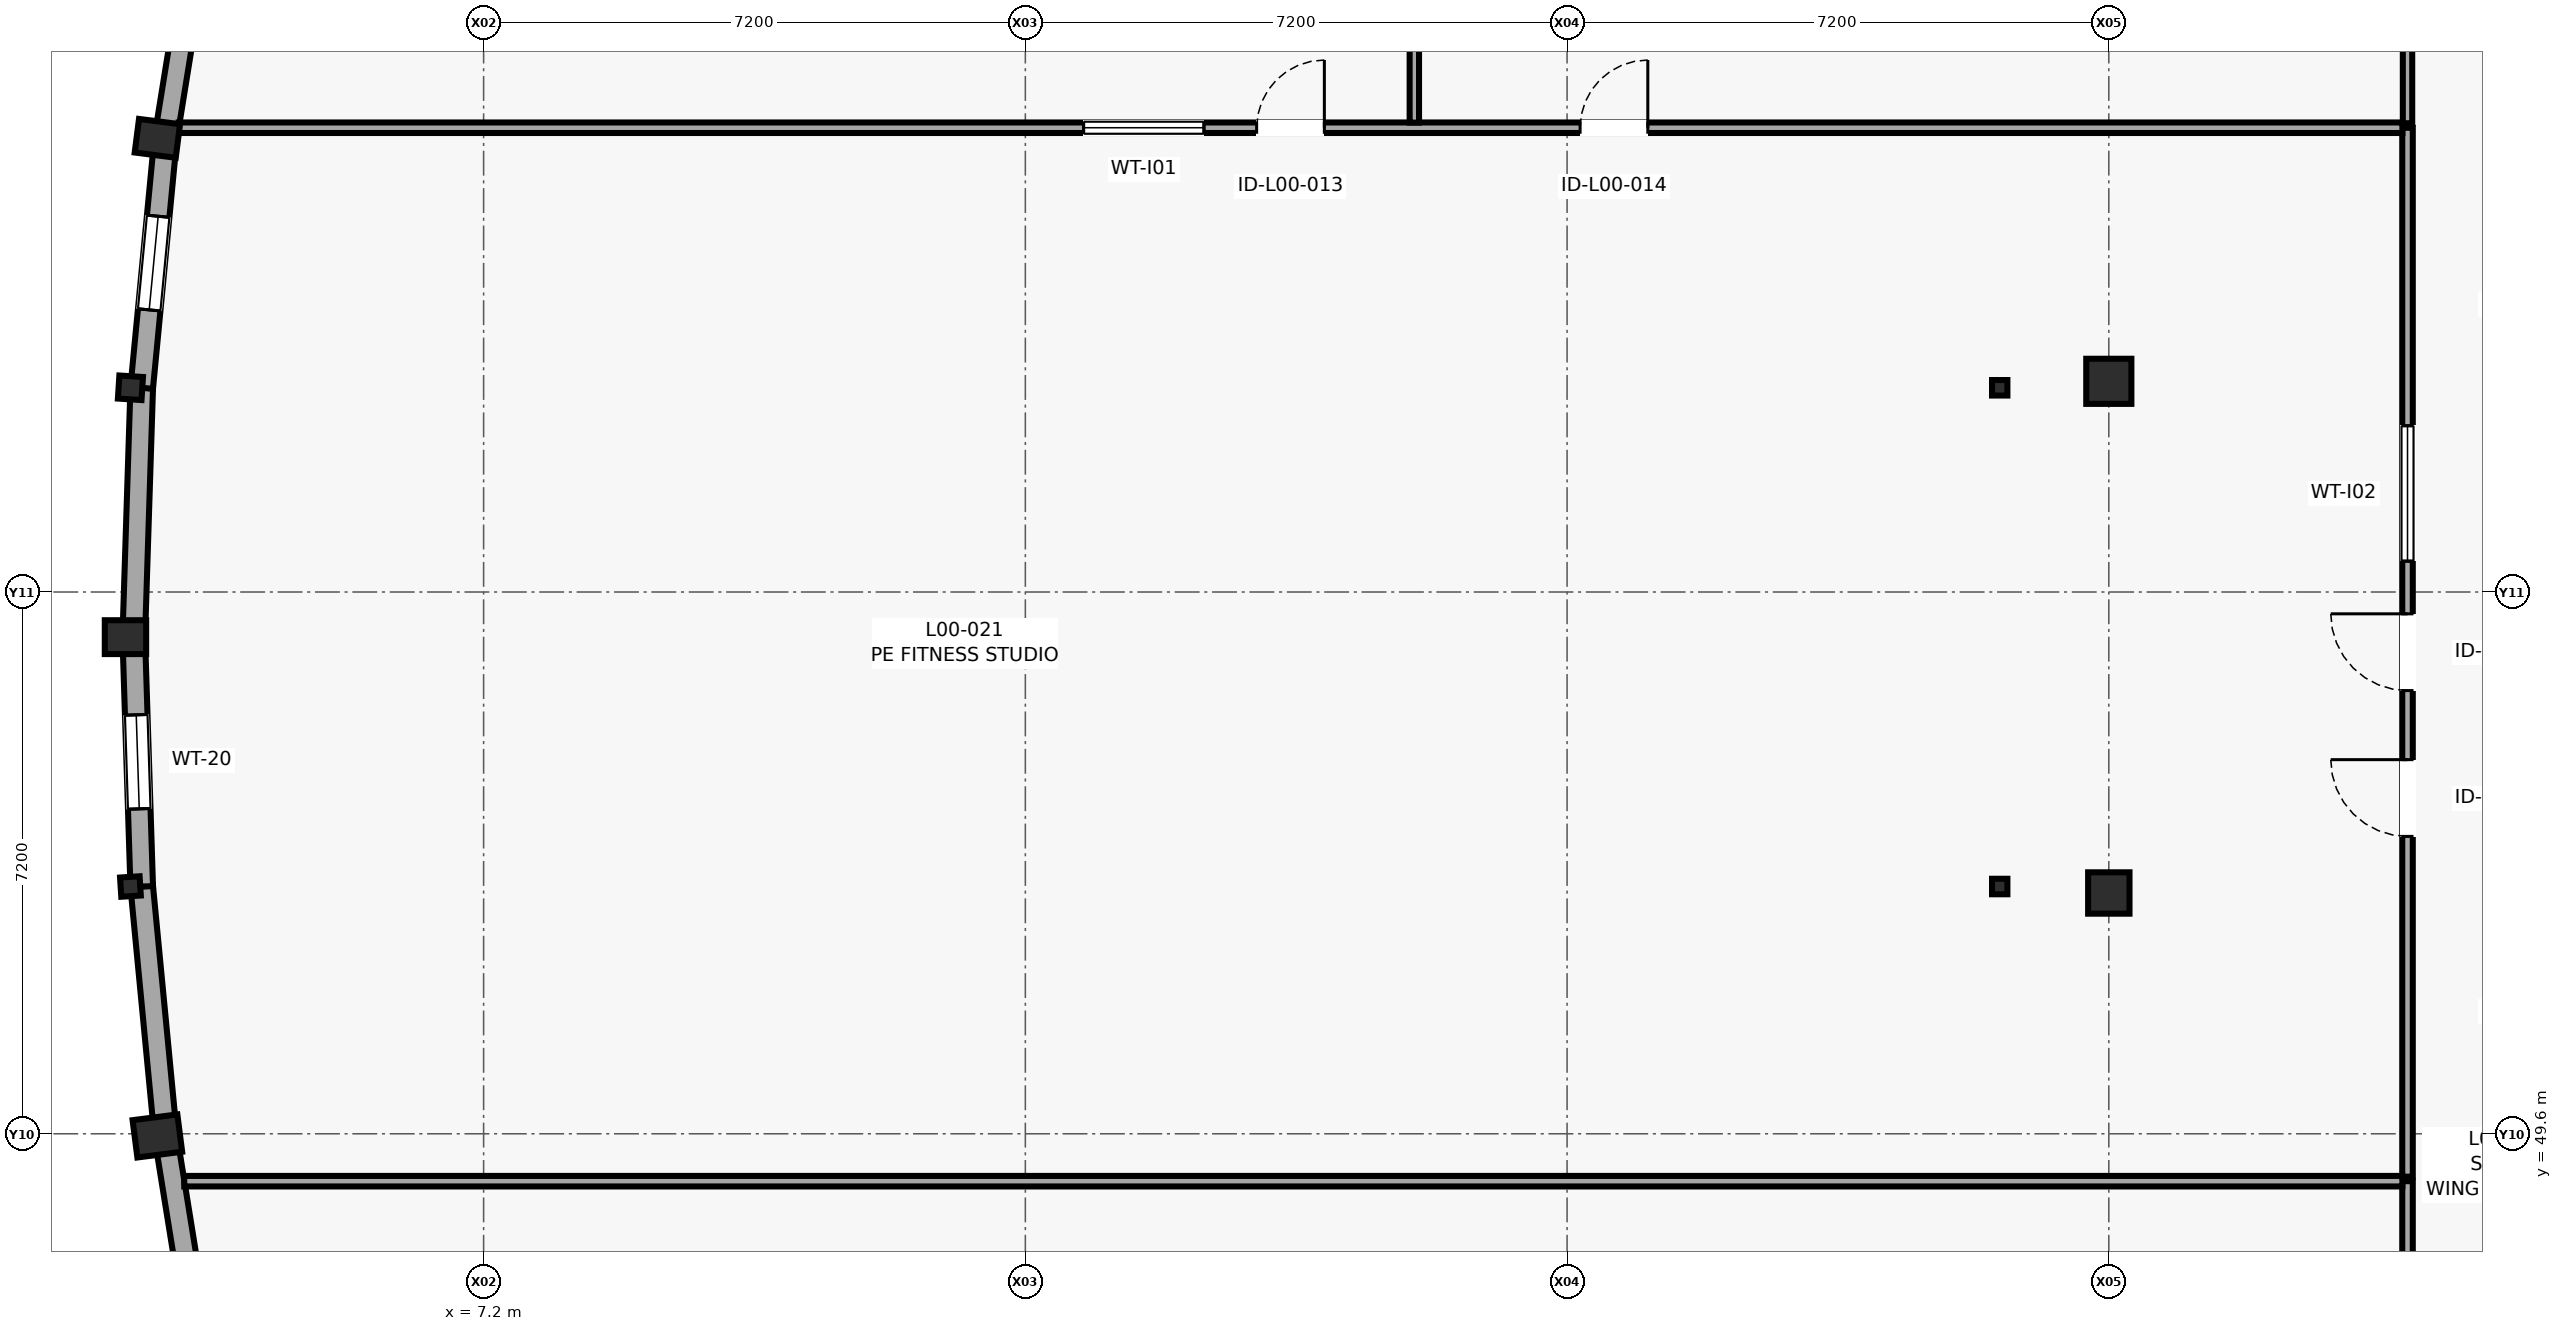
"""IFC4 building model, lengths in metres.
Left out: names, types, materials, properties, quantities, classifications, styles, units other than length and angle.
Written with IfcOpenShell. Run it as: python <this file> out.ifc"""

import sys

from ifc_helpers import new_model, si_unit, direction, frame, frame_2d, origin, origin_2d, place, context, subcontext, project, spatial, rectangle, i_section, extrude, element, fill, save


model = new_model("IFC4")
c1 = context("Model", 3, precision=1e-05, world=origin(), true_north=direction((0.0, 1.0)))
c2 = subcontext(c1, "Body", "Model", "MODEL_VIEW")
j1 = project(units=[si_unit("LENGTHUNIT", "METRE"), si_unit("PLANEANGLEUNIT", "RADIAN")], contexts=[c1])
p1 = place(None, origin())
s1 = spatial("IfcSite", under=j1, at=p1, CompositionType="ELEMENT")
p2 = place(p1, origin())
s2 = spatial("IfcBuilding", under=s1, at=p2, CompositionType="ELEMENT")
p3 = place(p2, origin())
s3 = spatial("IfcBuildingStorey", under=s2, at=p3, CompositionType="ELEMENT", Elevation=0.0)
p4 = place(p3, frame((2.44, 56.2, 0.0), z_axis=(0.0, 0.0, 1.0), x_axis=(0.0, 1.0, 0.0)))
e1 = element("IfcColumn", 1, at=p4, inside=s3, PredefinedType="PILASTER", context=c2, shape_type="SweptSolid", body=[
    extrude(rectangle(XDim=0.45, YDim=0.55, at=origin_2d()), origin(), (0.0, 0.0, 1.0), 4.2),
])
p5 = place(p3, frame((2.506, 52.886, 0.0), z_axis=(0.0, 0.0, 1.0), x_axis=(-0.063661438132, 0.99797155335, 0.0)))
e2 = element("IfcColumn", 2, at=p5, inside=s3, PredefinedType="COLUMN", context=c2, shape_type="SweptSolid", body=[
    extrude(i_section(OverallWidth=0.256, OverallDepth=0.26, WebThickness=0.01, FlangeThickness=0.017, FilletRadius=0.013, at=origin_2d()), origin(), (0.0, 0.0, 1.0), 4.2),
])
p6 = place(p3, frame((2.506, 59.514, 0.0), z_axis=(0.0, 0.0, 1.0), x_axis=(0.063661438132, 0.99797155335, 0.0)))
e3 = element("IfcColumn", 3, at=p6, inside=s3, PredefinedType="COLUMN", context=c2, shape_type="SweptSolid", body=[
    extrude(i_section(OverallWidth=0.307, OverallDepth=0.314, WebThickness=0.012, FlangeThickness=0.019, FilletRadius=0.015, at=origin_2d()), origin(), (0.0, 0.0, 1.0), 4.2),
])
p7 = place(p3, frame((2.864, 49.571, 0.0), z_axis=(0.0, 0.0, 1.0), x_axis=(-0.12741083733, 0.991850028246, 0.0)))
e4 = element("IfcColumn", 4, at=p7, inside=s3, PredefinedType="PILASTER", context=c2, shape_type="SweptSolid", body=[
    extrude(rectangle(XDim=0.5, YDim=0.6, at=origin_2d()), origin(), (0.0, 0.0, 1.0), 4.2),
])
p8 = place(p3, frame((2.864, 62.829, 0.0), z_axis=(0.0, 0.0, 1.0), x_axis=(0.12741083733, 0.991850028246, 0.0)))
e5 = element("IfcColumn", 5, at=p8, inside=s3, PredefinedType="PILASTER", context=c2, shape_type="SweptSolid", body=[
    extrude(rectangle(XDim=0.45, YDim=0.55, at=origin_2d()), origin(), (0.0, 0.0, 1.0), 4.2),
])
p9 = place(p3, frame((28.8, 52.8, 0.0), z_axis=(0.0, 0.0, 1.0), x_axis=(1.0, 0.0, 0.0)))
e6 = element("IfcColumn", 6, at=p9, inside=s3, PredefinedType="COLUMN", context=c2, shape_type="SweptSolid", body=[
    extrude(rectangle(XDim=0.55, YDim=0.55, at=origin_2d()), origin(), (0.0, 0.0, 1.0), 4.2),
])
p10 = place(p3, frame((28.8, 59.6, 0.0), z_axis=(0.0, 0.0, 1.0), x_axis=(1.0, 0.0, 0.0)))
e7 = element("IfcColumn", 7, at=p10, inside=s3, PredefinedType="COLUMN", context=c2, shape_type="SweptSolid", body=[
    extrude(rectangle(XDim=0.6, YDim=0.6, at=origin_2d()), origin(), (0.0, 0.0, 1.0), 4.2),
])
for number, where, z_axis, x_axis in (
    (8, (27.35, 52.886, 0.0), (0.0, 0.0, 1.0), (1.0, 0.0, 0.0)),
    (9, (27.35, 59.514, 0.0), (0.0, 0.0, 1.0), (1.0, 0.0, 0.0)),
):
    element("IfcColumn", number, at=place(p3, frame(where, z_axis=z_axis, x_axis=x_axis)), inside=s3, PredefinedType="COLUMN", context=c2, shape_type="SweptSolid", body=[
        extrude(i_section(OverallWidth=0.204, OverallDepth=0.206, WebThickness=0.008, FlangeThickness=0.012, FilletRadius=0.01, at=origin_2d()), origin(), (0.0, 0.0, 1.0), 3.935),
    ])
p11 = place(p3, frame((2.974, 49.571, 0.0), z_axis=(0.0, 0.0, 1.0), x_axis=(0.159349054769, -0.987222304623, 0.0)))
e10 = element("IfcWall", 10, at=p11, inside=s3, PredefinedType="SOLIDWALL", context=c2, shape_type="SweptSolid", body=[
    extrude(rectangle(XDim=3.357, YDim=0.3, at=frame_2d((1.678, 0.0))), origin(), (0.0, 0.0, 1.0), 3.68),
])
p12 = place(p3, frame((2.656, 52.886, 0.0), z_axis=(0.0, 0.0, 1.0), x_axis=(0.095525216858, -0.995427010355, 0.0)))
e11 = element("IfcWall", 11, at=p12, inside=s3, PredefinedType="SOLIDWALL", context=c2, shape_type="SweptSolid", body=[
    extrude(rectangle(XDim=3.33, YDim=0.3, at=frame_2d((1.665, 0.0))), origin(), (0.0, 0.0, 1.0), 3.68),
])
p13 = place(p3, frame((2.55, 56.2, 0.0), z_axis=(0.0, 0.0, 1.0), x_axis=(0.031956559473, -0.999489258725, 0.0)))
e12 = element("IfcWall", 12, at=p13, inside=s3, PredefinedType="SOLIDWALL", context=c2, shape_type="SweptSolid", body=[
    extrude(rectangle(XDim=3.316, YDim=0.3, at=frame_2d((1.658, 0.0))), origin(), (0.0, 0.0, 1.0), 3.68),
])
p14 = place(p13, frame((1.033, 0.0, 1.15)))
e13 = element("IfcOpeningElement", 13, at=p14, cuts=e12, PredefinedType="OPENING", context=c2, shape_type="SweptSolid", body=[
    extrude(rectangle(XDim=1.25, YDim=1.25, at=frame_2d((0.625, 0.625))), frame((0.0, 0.16, 0.0), z_axis=(0.0, -1.0, 0.0), x_axis=(1.0, 0.0, 0.0)), (0.0, 0.0, 1.0), 0.32),
])
p15 = place(p3, frame((2.656, 59.514, 0.0), z_axis=(0.0, 0.0, 1.0), x_axis=(-0.031956559473, -0.999489258725, 0.0)))
e14 = element("IfcWall", 14, at=p15, inside=s3, PredefinedType="SOLIDWALL", context=c2, shape_type="SweptSolid", body=[
    extrude(rectangle(XDim=3.316, YDim=0.3, at=frame_2d((1.658, 0.0))), origin(), (0.0, 0.0, 1.0), 3.68),
])
p16 = place(p3, frame((2.974, 62.829, 0.0), z_axis=(0.0, 0.0, 1.0), x_axis=(-0.095518246268, -0.995427679256, 0.0)))
e15 = element("IfcWall", 15, at=p16, inside=s3, PredefinedType="SOLIDWALL", context=c2, shape_type="SweptSolid", body=[
    extrude(rectangle(XDim=3.33, YDim=0.3, at=frame_2d((1.665, 0.0))), origin(), (0.0, 0.0, 1.0), 3.68),
])
p17 = place(p16, frame((1.04, 0.0, 1.15)))
e16 = element("IfcOpeningElement", 16, at=p17, cuts=e15, PredefinedType="OPENING", context=c2, shape_type="SweptSolid", body=[
    extrude(rectangle(XDim=1.25, YDim=1.25, at=frame_2d((0.625, 0.625))), frame((0.0, 0.16, 0.0), z_axis=(0.0, -1.0, 0.0), x_axis=(1.0, 0.0, 0.0)), (0.0, 0.0, 1.0), 0.32),
])
p18 = place(p3, frame((3.509, 66.143, 0.0), z_axis=(0.0, 0.0, 1.0), x_axis=(-0.159349054769, -0.987222304623, 0.0)))
e17 = element("IfcWall", 17, at=p18, inside=s3, PredefinedType="SOLIDWALL", context=c2, shape_type="SweptSolid", body=[
    extrude(rectangle(XDim=3.357, YDim=0.3, at=frame_2d((1.678, 0.0))), origin(), (0.0, 0.0, 1.0), 3.68),
])
p19 = place(p3, frame((32.77, 44.63, 0.0), z_axis=(0.0, 0.0, 1.0), x_axis=(0.0, 1.0, 0.0)))
e18 = element("IfcWall", 18, at=p19, inside=s3, PredefinedType="PARTITIONING", context=c2, shape_type="SweptSolid", body=[
    extrude(rectangle(XDim=4.34, YDim=0.14, at=frame_2d((2.17, 0.0))), origin(), (0.0, 0.0, 1.0), 3.93),
])
p20 = place(p19, frame((1.495, 0.0, 0.0)))
e19 = element("IfcOpeningElement", 19, at=p20, cuts=e18, PredefinedType="OPENING", context=c2, shape_type="SweptSolid", body=[
    extrude(rectangle(XDim=1.35, YDim=2.25, at=frame_2d((0.675, 1.125))), frame((0.0, 0.08, 0.0), z_axis=(0.0, -1.0, 0.0), x_axis=(1.0, 0.0, 0.0)), (0.0, 0.0, 1.0), 0.16),
])
p21 = place(p3, frame((32.702, 48.97, 0.0), z_axis=(0.0, 0.0, 1.0), x_axis=(-1.0, 0.0, 0.0)))
e20 = element("IfcWall", 20, at=p21, inside=s3, PredefinedType="PARTITIONING", context=c2, shape_type="SweptSolid", body=[
    extrude(rectangle(XDim=29.481, YDim=0.14, at=frame_2d((14.74, 0.0))), origin(), (0.0, 0.0, 1.0), 3.93),
])
p22 = place(p3, frame((32.77, 49.03, 0.0), z_axis=(0.0, 0.0, 1.0), x_axis=(0.0, 1.0, 0.0)))
e21 = element("IfcWall", 21, at=p22, inside=s3, PredefinedType="PARTITIONING", context=c2, shape_type="SweptSolid", body=[
    extrude(rectangle(XDim=13.94, YDim=0.14, at=frame_2d((6.97, 0.0))), origin(), (0.0, 0.0, 1.0), 3.93),
])
p23 = place(p22, frame((6.46, 0.0, 0.0)))
e22 = element("IfcOpeningElement", 22, at=p23, cuts=e21, PredefinedType="OPENING", context=c2, shape_type="SweptSolid", body=[
    extrude(rectangle(XDim=1.02, YDim=2.14, at=frame_2d((0.51, 1.07))), frame((0.0, 0.08, 0.0), z_axis=(0.0, -1.0, 0.0), x_axis=(1.0, 0.0, 0.0)), (0.0, 0.0, 1.0), 0.16),
])
p24 = place(p22, frame((4.522, 0.0, 0.0)))
e23 = element("IfcOpeningElement", 23, at=p24, cuts=e21, PredefinedType="OPENING", context=c2, shape_type="SweptSolid", body=[
    extrude(rectangle(XDim=1.02, YDim=2.14, at=frame_2d((0.51, 1.07))), frame((0.0, 0.08, 0.0), z_axis=(0.0, -1.0, 0.0), x_axis=(1.0, 0.0, 0.0)), (0.0, 0.0, 1.0), 0.16),
])
p25 = place(p22, frame((8.18, 0.0, 1.05)))
e24 = element("IfcOpeningElement", 24, at=p25, cuts=e21, PredefinedType="OPENING", context=c2, shape_type="SweptSolid", body=[
    extrude(rectangle(XDim=1.8, YDim=1.2, at=frame_2d((0.9, 0.6))), frame((0.0, 0.08, 0.0), z_axis=(0.0, -1.0, 0.0), x_axis=(1.0, 0.0, 0.0)), (0.0, 0.0, 1.0), 0.16),
])
p26 = place(p3, frame((32.702, 62.97, 0.0), z_axis=(0.0, 0.0, 1.0), x_axis=(-1.0, 0.0, 0.0)))
e25 = element("IfcWall", 25, at=p26, inside=s3, PredefinedType="PARTITIONING", context=c2, shape_type="SweptSolid", body=[
    extrude(rectangle(XDim=29.555, YDim=0.14, at=frame_2d((14.777, 0.0))), origin(), (0.0, 0.0, 1.0), 3.93),
])
p27 = place(p26, frame((14.328, 0.0, 0.0)))
e26 = element("IfcOpeningElement", 26, at=p27, cuts=e25, PredefinedType="OPENING", context=c2, shape_type="SweptSolid", body=[
    extrude(rectangle(XDim=0.9, YDim=2.1, at=frame_2d((0.45, 1.05))), frame((0.0, 0.08, 0.0), z_axis=(0.0, -1.0, 0.0), x_axis=(1.0, 0.0, 0.0)), (0.0, 0.0, 1.0), 0.16),
])
p28 = place(p26, frame((10.029, 0.0, 0.0)))
e27 = element("IfcOpeningElement", 27, at=p28, cuts=e25, PredefinedType="OPENING", context=c2, shape_type="SweptSolid", body=[
    extrude(rectangle(XDim=0.9, YDim=2.1, at=frame_2d((0.45, 1.05))), frame((0.0, 0.08, 0.0), z_axis=(0.0, -1.0, 0.0), x_axis=(1.0, 0.0, 0.0)), (0.0, 0.0, 1.0), 0.16),
])
p29 = place(p26, frame((15.928, 0.0, 1.05)))
e28 = element("IfcOpeningElement", 28, at=p29, cuts=e25, PredefinedType="OPENING", context=c2, shape_type="SweptSolid", body=[
    extrude(rectangle(XDim=1.6, YDim=1.1, at=frame_2d((0.8, 0.55))), frame((0.0, 0.08, 0.0), z_axis=(0.0, -1.0, 0.0), x_axis=(1.0, 0.0, 0.0)), (0.0, 0.0, 1.0), 0.16),
])
p30 = place(p3, frame((19.57, 63.038, 0.0), z_axis=(0.0, 0.0, 1.0), x_axis=(0.0, 1.0, 0.0)))
e29 = element("IfcWall", 29, at=p30, inside=s3, PredefinedType="PARTITIONING", context=c2, shape_type="SweptSolid", body=[
    extrude(rectangle(XDim=16.044, YDim=0.125, at=frame_2d((8.022, 0.0))), origin(), (0.0, 0.0, 1.0), 3.93),
])
p31 = place(p3, frame((32.77, 63.03, 0.0), z_axis=(0.0, 0.0, 1.0), x_axis=(0.0, 1.0, 0.0)))
e30 = element("IfcWall", 30, at=p31, inside=s3, PredefinedType="PARTITIONING", context=c2, shape_type="SweptSolid", body=[
    extrude(rectangle(XDim=4.74, YDim=0.125, at=frame_2d((2.37, 0.0))), origin(), (0.0, 0.0, 1.0), 3.93),
])
p32 = place(p31, frame((1.92, 0.0, 0.0)))
e31 = element("IfcOpeningElement", 31, at=p32, cuts=e30, PredefinedType="OPENING", context=c2, shape_type="SweptSolid", body=[
    extrude(rectangle(XDim=0.9, YDim=2.1, at=frame_2d((0.45, 1.05))), frame((0.0, 0.073, 0.0), z_axis=(0.0, -1.0, 0.0), x_axis=(1.0, 0.0, 0.0)), (0.0, 0.0, 1.0), 0.145),
])
p33 = place(p14, origin())
e32 = element("IfcWindow", 32, at=p33, inside=s3, PartitioningType="SINGLE_PANEL", PredefinedType="WINDOW", context=c2, shape_type="SweptSolid", body=[
    extrude(rectangle(XDim=1.25, YDim=1.25, at=frame_2d((0.625, 0.625))), frame((0.0, 0.03, 0.0), z_axis=(0.0, -1.0, 0.0), x_axis=(1.0, 0.0, 0.0)), (0.0, 0.0, 1.0), 0.06),
])
fill(e13, e32)
p34 = place(p17, origin())
e33 = element("IfcWindow", 33, at=p34, inside=s3, PartitioningType="SINGLE_PANEL", PredefinedType="WINDOW", context=c2, shape_type="SweptSolid", body=[
    extrude(rectangle(XDim=1.25, YDim=1.25, at=frame_2d((0.625, 0.625))), frame((0.0, 0.03, 0.0), z_axis=(0.0, -1.0, 0.0), x_axis=(1.0, 0.0, 0.0)), (0.0, 0.0, 1.0), 0.06),
])
fill(e16, e33)
p35 = place(p23, origin())
e34 = element("IfcDoor", 34, at=p35, inside=s3, OperationType="SINGLE_SWING_RIGHT", PredefinedType="DOOR", context=c2, shape_type="SweptSolid", body=[
    extrude(rectangle(XDim=1.02, YDim=2.14, at=frame_2d((0.51, 1.07))), frame((0.0, 0.025, 0.0), z_axis=(0.0, -1.0, 0.0), x_axis=(1.0, 0.0, 0.0)), (0.0, 0.0, 1.0), 0.05),
])
fill(e22, e34)
p36 = place(p24, origin())
e35 = element("IfcDoor", 35, at=p36, inside=s3, OperationType="SINGLE_SWING_RIGHT", PredefinedType="DOOR", context=c2, shape_type="SweptSolid", body=[
    extrude(rectangle(XDim=1.02, YDim=2.14, at=frame_2d((0.51, 1.07))), frame((0.0, 0.025, 0.0), z_axis=(0.0, -1.0, 0.0), x_axis=(1.0, 0.0, 0.0)), (0.0, 0.0, 1.0), 0.05),
])
fill(e23, e35)
p37 = place(p25, origin())
e36 = element("IfcWindow", 36, at=p37, inside=s3, PartitioningType="SINGLE_PANEL", PredefinedType="WINDOW", context=c2, shape_type="SweptSolid", body=[
    extrude(rectangle(XDim=1.8, YDim=1.2, at=frame_2d((0.9, 0.6))), frame((0.0, 0.03, 0.0), z_axis=(0.0, -1.0, 0.0), x_axis=(1.0, 0.0, 0.0)), (0.0, 0.0, 1.0), 0.06),
])
fill(e24, e36)
p38 = place(p27, frame((0.9, 0.0, 0.0), z_axis=(0.0, 0.0, 1.0), x_axis=(-1.0, 0.0, 0.0)))
e37 = element("IfcDoor", 37, at=p38, inside=s3, OperationType="SINGLE_SWING_LEFT", PredefinedType="DOOR", context=c2, shape_type="SweptSolid", body=[
    extrude(rectangle(XDim=0.9, YDim=2.1, at=frame_2d((0.45, 1.05))), frame((0.0, 0.025, 0.0), z_axis=(0.0, -1.0, 0.0), x_axis=(1.0, 0.0, 0.0)), (0.0, 0.0, 1.0), 0.05),
])
fill(e26, e37)
p39 = place(p28, frame((0.9, 0.0, 0.0), z_axis=(0.0, 0.0, 1.0), x_axis=(-1.0, 0.0, 0.0)))
e38 = element("IfcDoor", 38, at=p39, inside=s3, OperationType="SINGLE_SWING_LEFT", PredefinedType="DOOR", context=c2, shape_type="SweptSolid", body=[
    extrude(rectangle(XDim=0.9, YDim=2.1, at=frame_2d((0.45, 1.05))), frame((0.0, 0.025, 0.0), z_axis=(0.0, -1.0, 0.0), x_axis=(1.0, 0.0, 0.0)), (0.0, 0.0, 1.0), 0.05),
])
fill(e27, e38)
p40 = place(p29, origin())
e39 = element("IfcWindow", 39, at=p40, inside=s3, PartitioningType="SINGLE_PANEL", PredefinedType="WINDOW", context=c2, shape_type="SweptSolid", body=[
    extrude(rectangle(XDim=1.6, YDim=1.1, at=frame_2d((0.8, 0.55))), frame((0.0, 0.03, 0.0), z_axis=(0.0, -1.0, 0.0), x_axis=(1.0, 0.0, 0.0)), (0.0, 0.0, 1.0), 0.06),
])
fill(e28, e39)
save(model, sys.argv[1])
